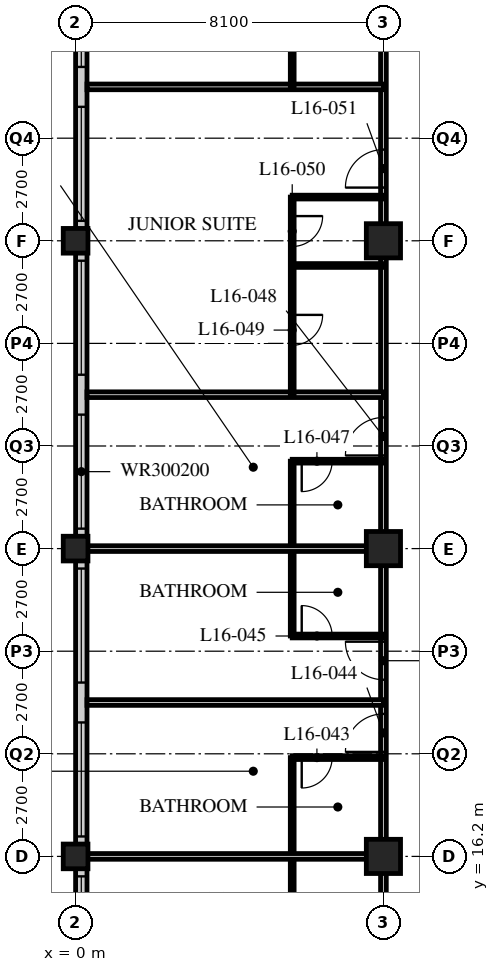
"""IFC4 building model, lengths in metres.
Left out: names, types, materials, properties, quantities, classifications, styles, units other than length and angle.
Written with IfcOpenShell. Run it as: python <this file> out.ifc"""

import sys

from ifc_helpers import new_model, si_unit, direction, frame, frame_2d, origin, origin_2d, place, context, subcontext, project, spatial, rectangle, hollow_rectangle, extrude, element, fill, save


model = new_model("IFC4")
c1 = context("Model", 3, precision=1e-05, world=origin(), true_north=direction((0.0, 1.0)))
c2 = subcontext(c1, "Body", "Model", "MODEL_VIEW")
j1 = project(units=[si_unit("LENGTHUNIT", "METRE"), si_unit("PLANEANGLEUNIT", "RADIAN")], contexts=[c1])
p1 = place(None, origin())
s1 = spatial("IfcSite", under=j1, at=p1, CompositionType="ELEMENT")
p2 = place(p1, origin())
s2 = spatial("IfcBuilding", under=s1, at=p2, CompositionType="ELEMENT")
p3 = place(p2, frame((0.0, 0.0, 67.0)))
s3 = spatial("IfcBuildingStorey", under=s2, at=p3, CompositionType="ELEMENT", Elevation=67.0)
for number, where, z_axis, x_axis in (
    (1, (0.0, 16.2, 0.0), (0.0, 0.0, 1.0), (1.0, 0.0, 0.0)),
    (2, (0.0, 24.3, 0.0), (0.0, 0.0, 1.0), (1.0, 0.0, 0.0)),
    (3, (0.0, 32.4, 0.0), (0.0, 0.0, 1.0), (1.0, 0.0, 0.0)),
):
    element("IfcColumn", number, at=place(p3, frame(where, z_axis=z_axis, x_axis=x_axis)), inside=s3, PredefinedType="COLUMN", context=c2, shape_type="SweptSolid", body=[
        extrude(hollow_rectangle(XDim=0.65, YDim=0.65, WallThickness=0.05, at=origin_2d()), origin(), (0.0, 0.0, 1.0), 3.4),
    ])
for number, where, z_axis, x_axis in (
    (4, (8.1, 16.2, 0.0), (0.0, 0.0, 1.0), (1.0, 0.0, 0.0)),
    (5, (8.1, 24.3, 0.0), (0.0, 0.0, 1.0), (1.0, 0.0, 0.0)),
    (6, (8.1, 32.4, 0.0), (0.0, 0.0, 1.0), (1.0, 0.0, 0.0)),
):
    element("IfcColumn", number, at=place(p3, frame(where, z_axis=z_axis, x_axis=x_axis)), inside=s3, PredefinedType="COLUMN", context=c2, shape_type="SweptSolid", body=[
        extrude(hollow_rectangle(XDim=0.9, YDim=0.9, WallThickness=0.09, at=origin_2d()), origin(), (0.0, 0.0, 1.0), 3.4),
    ])
p4 = place(p3, frame((0.15, 40.2, 0.0), z_axis=(0.0, 0.0, 1.0), x_axis=(0.0, -1.0, 0.0)))
e7 = element("IfcWall", 7, at=p4, inside=s3, PredefinedType="SOLIDWALL", context=c2, shape_type="SweptSolid", body=[
    extrude(rectangle(XDim=32.1, YDim=0.3, at=frame_2d((16.05, 0.0))), origin(), (0.0, 0.0, 1.0), 3.19),
])
p5 = place(p4, frame((0.225, 0.0, 0.9)))
e8 = element("IfcOpeningElement", 8, at=p5, cuts=e7, PredefinedType="OPENING", context=c2, shape_type="SweptSolid", body=[
    extrude(rectangle(XDim=3.0, YDim=2.0, at=frame_2d((1.5, 1.0))), frame((0.0, 0.16, 0.0), z_axis=(0.0, -1.0, 0.0), x_axis=(1.0, 0.0, 0.0)), (0.0, 0.0, 1.0), 0.32),
])
p6 = place(p4, frame((4.275, 0.0, 0.9)))
e9 = element("IfcOpeningElement", 9, at=p6, cuts=e7, PredefinedType="OPENING", context=c2, shape_type="SweptSolid", body=[
    extrude(rectangle(XDim=3.0, YDim=2.0, at=frame_2d((1.5, 1.0))), frame((0.0, 0.16, 0.0), z_axis=(0.0, -1.0, 0.0), x_axis=(1.0, 0.0, 0.0)), (0.0, 0.0, 1.0), 0.32),
])
p7 = place(p4, frame((8.325, 0.0, 0.9)))
e10 = element("IfcOpeningElement", 10, at=p7, cuts=e7, PredefinedType="OPENING", context=c2, shape_type="SweptSolid", body=[
    extrude(rectangle(XDim=3.0, YDim=2.0, at=frame_2d((1.5, 1.0))), frame((0.0, 0.16, 0.0), z_axis=(0.0, -1.0, 0.0), x_axis=(1.0, 0.0, 0.0)), (0.0, 0.0, 1.0), 0.32),
])
p8 = place(p4, frame((12.375, 0.0, 0.9)))
e11 = element("IfcOpeningElement", 11, at=p8, cuts=e7, PredefinedType="OPENING", context=c2, shape_type="SweptSolid", body=[
    extrude(rectangle(XDim=3.0, YDim=2.0, at=frame_2d((1.5, 1.0))), frame((0.0, 0.16, 0.0), z_axis=(0.0, -1.0, 0.0), x_axis=(1.0, 0.0, 0.0)), (0.0, 0.0, 1.0), 0.32),
])
p9 = place(p4, frame((16.425, 0.0, 0.9)))
e12 = element("IfcOpeningElement", 12, at=p9, cuts=e7, PredefinedType="OPENING", context=c2, shape_type="SweptSolid", body=[
    extrude(rectangle(XDim=3.0, YDim=2.0, at=frame_2d((1.5, 1.0))), frame((0.0, 0.16, 0.0), z_axis=(0.0, -1.0, 0.0), x_axis=(1.0, 0.0, 0.0)), (0.0, 0.0, 1.0), 0.32),
])
p10 = place(p4, frame((20.475, 0.0, 0.9)))
e13 = element("IfcOpeningElement", 13, at=p10, cuts=e7, PredefinedType="OPENING", context=c2, shape_type="SweptSolid", body=[
    extrude(rectangle(XDim=3.0, YDim=2.0, at=frame_2d((1.5, 1.0))), frame((0.0, 0.16, 0.0), z_axis=(0.0, -1.0, 0.0), x_axis=(1.0, 0.0, 0.0)), (0.0, 0.0, 1.0), 0.32),
])
p11 = place(p4, frame((24.525, 0.0, 0.9)))
e14 = element("IfcOpeningElement", 14, at=p11, cuts=e7, PredefinedType="OPENING", context=c2, shape_type="SweptSolid", body=[
    extrude(rectangle(XDim=3.0, YDim=2.0, at=frame_2d((1.5, 1.0))), frame((0.0, 0.16, 0.0), z_axis=(0.0, -1.0, 0.0), x_axis=(1.0, 0.0, 0.0)), (0.0, 0.0, 1.0), 0.32),
])
p12 = place(p4, frame((28.575, 0.0, 0.9)))
e15 = element("IfcOpeningElement", 15, at=p12, cuts=e7, PredefinedType="OPENING", context=c2, shape_type="SweptSolid", body=[
    extrude(rectangle(XDim=3.0, YDim=2.0, at=frame_2d((1.5, 1.0))), frame((0.0, 0.16, 0.0), z_axis=(0.0, -1.0, 0.0), x_axis=(1.0, 0.0, 0.0)), (0.0, 0.0, 1.0), 0.32),
])
p13 = place(p3, frame((8.1, 12.15, 0.0), z_axis=(0.0, 0.0, 1.0), x_axis=(0.0, 1.0, 0.0)))
e16 = element("IfcWall", 16, at=p13, inside=s3, PredefinedType="PARTITIONING", context=c2, shape_type="SweptSolid", body=[
    extrude(rectangle(XDim=30.15, YDim=0.15, at=frame_2d((15.075, 0.0))), origin(), (0.0, 0.0, 1.0), 2.578),
])
p14 = place(p13, frame((0.6, 0.0, 0.0)))
e17 = element("IfcOpeningElement", 17, at=p14, cuts=e16, PredefinedType="OPENING", context=c2, shape_type="SweptSolid", body=[
    extrude(rectangle(XDim=1.0, YDim=2.1, at=frame_2d((0.5, 1.05))), frame((0.0, 0.085, 0.0), z_axis=(0.0, -1.0, 0.0), x_axis=(1.0, 0.0, 0.0)), (0.0, 0.0, 1.0), 0.17),
])
p15 = place(p13, frame((6.8, 0.0, 0.0)))
e18 = element("IfcOpeningElement", 18, at=p15, cuts=e16, PredefinedType="OPENING", context=c2, shape_type="SweptSolid", body=[
    extrude(rectangle(XDim=1.0, YDim=2.1, at=frame_2d((0.5, 1.05))), frame((0.0, 0.085, 0.0), z_axis=(0.0, -1.0, 0.0), x_axis=(1.0, 0.0, 0.0)), (0.0, 0.0, 1.0), 0.17),
])
p16 = place(p13, frame((8.7, 0.0, 0.0)))
e19 = element("IfcOpeningElement", 19, at=p16, cuts=e16, PredefinedType="OPENING", context=c2, shape_type="SweptSolid", body=[
    extrude(rectangle(XDim=1.0, YDim=2.1, at=frame_2d((0.5, 1.05))), frame((0.0, 0.085, 0.0), z_axis=(0.0, -1.0, 0.0), x_axis=(1.0, 0.0, 0.0)), (0.0, 0.0, 1.0), 0.17),
])
p17 = place(p13, frame((14.6, 0.0, 0.0)))
e20 = element("IfcOpeningElement", 20, at=p17, cuts=e16, PredefinedType="OPENING", context=c2, shape_type="SweptSolid", body=[
    extrude(rectangle(XDim=1.0, YDim=2.1, at=frame_2d((0.5, 1.05))), frame((0.0, 0.085, 0.0), z_axis=(0.0, -1.0, 0.0), x_axis=(1.0, 0.0, 0.0)), (0.0, 0.0, 1.0), 0.17),
])
p18 = place(p13, frame((21.65, 0.0, 0.0)))
e21 = element("IfcOpeningElement", 21, at=p18, cuts=e16, PredefinedType="OPENING", context=c2, shape_type="SweptSolid", body=[
    extrude(rectangle(XDim=1.0, YDim=2.1, at=frame_2d((0.5, 1.05))), frame((0.0, 0.085, 0.0), z_axis=(0.0, -1.0, 0.0), x_axis=(1.0, 0.0, 0.0)), (0.0, 0.0, 1.0), 0.17),
])
p19 = place(p13, frame((26.75, 0.0, 0.0)))
e22 = element("IfcOpeningElement", 22, at=p19, cuts=e16, PredefinedType="OPENING", context=c2, shape_type="SweptSolid", body=[
    extrude(rectangle(XDim=1.0, YDim=2.1, at=frame_2d((0.5, 1.05))), frame((0.0, 0.085, 0.0), z_axis=(0.0, -1.0, 0.0), x_axis=(1.0, 0.0, 0.0)), (0.0, 0.0, 1.0), 0.17),
])
p20 = place(p3, frame((5.7, 13.9, 0.0), z_axis=(0.0, 0.0, 1.0), x_axis=(0.0, 1.0, 0.0)))
e23 = element("IfcWall", 23, at=p20, inside=s3, PredefinedType="PARTITIONING", context=c2, shape_type="SweptSolid", body=[
    extrude(rectangle(XDim=4.9, YDim=0.1, at=frame_2d((2.45, 0.0))), origin(), (0.0, 0.0, 1.0), 3.19),
])
p21 = place(p3, frame((8.1, 16.2, 0.0), z_axis=(0.0, 0.0, 1.0), x_axis=(-1.0, 0.0, 0.0)))
e24 = element("IfcWall", 24, at=p21, inside=s3, PredefinedType="PARTITIONING", context=c2, shape_type="SweptSolid", body=[
    extrude(rectangle(XDim=7.8, YDim=0.15, at=frame_2d((3.9, 0.0))), origin(), (0.0, 0.0, 1.0), 2.578),
])
p22 = place(p3, frame((8.1, 18.8, 0.0), z_axis=(0.0, 0.0, 1.0), x_axis=(-1.0, 0.0, 0.0)))
e25 = element("IfcWall", 25, at=p22, inside=s3, PredefinedType="PARTITIONING", context=c2, shape_type="SweptSolid", body=[
    extrude(rectangle(XDim=2.4, YDim=0.1, at=frame_2d((1.2, 0.0))), origin(), (0.0, 0.0, 1.0), 3.19),
])
p23 = place(p22, frame((1.35, 0.0, 0.0)))
e26 = element("IfcOpeningElement", 26, at=p23, cuts=e25, PredefinedType="OPENING", context=c2, shape_type="SweptSolid", body=[
    extrude(rectangle(XDim=0.8, YDim=2.1, at=frame_2d((0.4, 1.05))), frame((0.0, 0.06, 0.0), z_axis=(0.0, -1.0, 0.0), x_axis=(1.0, 0.0, 0.0)), (0.0, 0.0, 1.0), 0.12),
])
p24 = place(p3, frame((8.1, 20.25, 0.0), z_axis=(0.0, 0.0, 1.0), x_axis=(-1.0, 0.0, 0.0)))
e27 = element("IfcWall", 27, at=p24, inside=s3, PredefinedType="PARTITIONING", context=c2, shape_type="SweptSolid", body=[
    extrude(rectangle(XDim=7.8, YDim=0.15, at=frame_2d((3.9, 0.0))), origin(), (0.0, 0.0, 1.0), 3.19),
])
p25 = place(p3, frame((5.7, 22.0, 0.0), z_axis=(0.0, 0.0, 1.0), x_axis=(0.0, 1.0, 0.0)))
e28 = element("IfcWall", 28, at=p25, inside=s3, PredefinedType="PARTITIONING", context=c2, shape_type="SweptSolid", body=[
    extrude(rectangle(XDim=4.6, YDim=0.1, at=frame_2d((2.3, 0.0))), origin(), (0.0, 0.0, 1.0), 3.19),
])
p26 = place(p3, frame((8.1, 22.0, 0.0), z_axis=(0.0, 0.0, 1.0), x_axis=(-1.0, 0.0, 0.0)))
e29 = element("IfcWall", 29, at=p26, inside=s3, PredefinedType="PARTITIONING", context=c2, shape_type="SweptSolid", body=[
    extrude(rectangle(XDim=2.4, YDim=0.1, at=frame_2d((1.2, 0.0))), origin(), (0.0, 0.0, 1.0), 3.19),
])
p27 = place(p26, frame((1.35, 0.0, 0.0)))
e30 = element("IfcOpeningElement", 30, at=p27, cuts=e29, PredefinedType="OPENING", context=c2, shape_type="SweptSolid", body=[
    extrude(rectangle(XDim=0.8, YDim=2.1, at=frame_2d((0.4, 1.05))), frame((0.0, 0.06, 0.0), z_axis=(0.0, -1.0, 0.0), x_axis=(1.0, 0.0, 0.0)), (0.0, 0.0, 1.0), 0.12),
])
p28 = place(p3, frame((8.1, 24.3, 0.0), z_axis=(0.0, 0.0, 1.0), x_axis=(-1.0, 0.0, 0.0)))
e31 = element("IfcWall", 31, at=p28, inside=s3, PredefinedType="PARTITIONING", context=c2, shape_type="SweptSolid", body=[
    extrude(rectangle(XDim=7.8, YDim=0.15, at=frame_2d((3.9, 0.0))), origin(), (0.0, 0.0, 1.0), 2.578),
])
p29 = place(p3, frame((8.1, 26.6, 0.0), z_axis=(0.0, 0.0, 1.0), x_axis=(-1.0, 0.0, 0.0)))
e32 = element("IfcWall", 32, at=p29, inside=s3, PredefinedType="PARTITIONING", context=c2, shape_type="SweptSolid", body=[
    extrude(rectangle(XDim=2.4, YDim=0.1, at=frame_2d((1.2, 0.0))), origin(), (0.0, 0.0, 1.0), 3.19),
])
p30 = place(p29, frame((1.35, 0.0, 0.0)))
e33 = element("IfcOpeningElement", 33, at=p30, cuts=e32, PredefinedType="OPENING", context=c2, shape_type="SweptSolid", body=[
    extrude(rectangle(XDim=0.8, YDim=2.1, at=frame_2d((0.4, 1.05))), frame((0.0, 0.06, 0.0), z_axis=(0.0, -1.0, 0.0), x_axis=(1.0, 0.0, 0.0)), (0.0, 0.0, 1.0), 0.12),
])
p31 = place(p3, frame((8.1, 28.35, 0.0), z_axis=(0.0, 0.0, 1.0), x_axis=(-1.0, 0.0, 0.0)))
e34 = element("IfcWall", 34, at=p31, inside=s3, PredefinedType="PARTITIONING", context=c2, shape_type="SweptSolid", body=[
    extrude(rectangle(XDim=7.8, YDim=0.15, at=frame_2d((3.9, 0.0))), origin(), (0.0, 0.0, 1.0), 3.19),
])
p32 = place(p3, frame((5.7, 28.35, 0.0), z_axis=(0.0, 0.0, 1.0), x_axis=(0.0, 1.0, 0.0)))
e35 = element("IfcWall", 35, at=p32, inside=s3, PredefinedType="PARTITIONING", context=c2, shape_type="SweptSolid", body=[
    extrude(rectangle(XDim=5.2, YDim=0.1, at=frame_2d((2.6, 0.0))), origin(), (0.0, 0.0, 1.0), 3.19),
])
p33 = place(p32, frame((1.3, 0.0, 0.0)))
e36 = element("IfcOpeningElement", 36, at=p33, cuts=e35, PredefinedType="OPENING", context=c2, shape_type="SweptSolid", body=[
    extrude(rectangle(XDim=0.8, YDim=2.1, at=frame_2d((0.4, 1.05))), frame((0.0, 0.06, 0.0), z_axis=(0.0, -1.0, 0.0), x_axis=(1.0, 0.0, 0.0)), (0.0, 0.0, 1.0), 0.12),
])
p34 = place(p32, frame((3.9, 0.0, 0.0)))
e37 = element("IfcOpeningElement", 37, at=p34, cuts=e35, PredefinedType="OPENING", context=c2, shape_type="SweptSolid", body=[
    extrude(rectangle(XDim=0.8, YDim=2.1, at=frame_2d((0.4, 1.05))), frame((0.0, 0.06, 0.0), z_axis=(0.0, -1.0, 0.0), x_axis=(1.0, 0.0, 0.0)), (0.0, 0.0, 1.0), 0.12),
])
for number, where, z_axis, x_axis in (
    (38, (8.1, 31.75, 0.0), (0.0, 0.0, 1.0), (-1.0, 0.0, 0.0)),
    (39, (8.1, 33.55, 0.0), (0.0, 0.0, 1.0), (-1.0, 0.0, 0.0)),
):
    element("IfcWall", number, at=place(p3, frame(where, z_axis=z_axis, x_axis=x_axis)), inside=s3, PredefinedType="PARTITIONING", context=c2, shape_type="SweptSolid", body=[
        extrude(rectangle(XDim=2.4, YDim=0.1, at=frame_2d((1.2, 0.0))), origin(), (0.0, 0.0, 1.0), 3.19),
    ])
p35 = place(p3, frame((8.1, 36.45, 0.0), z_axis=(0.0, 0.0, 1.0), x_axis=(-1.0, 0.0, 0.0)))
e40 = element("IfcWall", 40, at=p35, inside=s3, PredefinedType="PARTITIONING", context=c2, shape_type="SweptSolid", body=[
    extrude(rectangle(XDim=7.8, YDim=0.15, at=frame_2d((3.9, 0.0))), origin(), (0.0, 0.0, 1.0), 3.19),
])
p36 = place(p3, frame((5.7, 36.45, 0.0), z_axis=(0.0, 0.0, 1.0), x_axis=(0.0, 1.0, 0.0)))
e41 = element("IfcWall", 41, at=p36, inside=s3, PredefinedType="PARTITIONING", context=c2, shape_type="SweptSolid", body=[
    extrude(rectangle(XDim=2.3, YDim=0.1, at=frame_2d((1.15, 0.0))), origin(), (0.0, 0.0, 1.0), 3.19),
])
p37 = place(p5, origin())
e42 = element("IfcWindow", 42, at=p37, inside=s3, PartitioningType="SINGLE_PANEL", PredefinedType="WINDOW", context=c2, shape_type="SweptSolid", body=[
    extrude(rectangle(XDim=3.0, YDim=2.0, at=frame_2d((1.5, 1.0))), frame((0.0, 0.03, 0.0), z_axis=(0.0, -1.0, 0.0), x_axis=(1.0, 0.0, 0.0)), (0.0, 0.0, 1.0), 0.06),
])
fill(e8, e42)
p38 = place(p6, origin())
e43 = element("IfcWindow", 43, at=p38, inside=s3, PartitioningType="SINGLE_PANEL", PredefinedType="WINDOW", context=c2, shape_type="SweptSolid", body=[
    extrude(rectangle(XDim=3.0, YDim=2.0, at=frame_2d((1.5, 1.0))), frame((0.0, 0.03, 0.0), z_axis=(0.0, -1.0, 0.0), x_axis=(1.0, 0.0, 0.0)), (0.0, 0.0, 1.0), 0.06),
])
fill(e9, e43)
p39 = place(p7, origin())
e44 = element("IfcWindow", 44, at=p39, inside=s3, PartitioningType="SINGLE_PANEL", PredefinedType="WINDOW", context=c2, shape_type="SweptSolid", body=[
    extrude(rectangle(XDim=3.0, YDim=2.0, at=frame_2d((1.5, 1.0))), frame((0.0, 0.03, 0.0), z_axis=(0.0, -1.0, 0.0), x_axis=(1.0, 0.0, 0.0)), (0.0, 0.0, 1.0), 0.06),
])
fill(e10, e44)
p40 = place(p8, origin())
e45 = element("IfcWindow", 45, at=p40, inside=s3, PartitioningType="SINGLE_PANEL", PredefinedType="WINDOW", context=c2, shape_type="SweptSolid", body=[
    extrude(rectangle(XDim=3.0, YDim=2.0, at=frame_2d((1.5, 1.0))), frame((0.0, 0.03, 0.0), z_axis=(0.0, -1.0, 0.0), x_axis=(1.0, 0.0, 0.0)), (0.0, 0.0, 1.0), 0.06),
])
fill(e11, e45)
p41 = place(p9, origin())
e46 = element("IfcWindow", 46, at=p41, inside=s3, PartitioningType="SINGLE_PANEL", PredefinedType="WINDOW", context=c2, shape_type="SweptSolid", body=[
    extrude(rectangle(XDim=3.0, YDim=2.0, at=frame_2d((1.5, 1.0))), frame((0.0, 0.03, 0.0), z_axis=(0.0, -1.0, 0.0), x_axis=(1.0, 0.0, 0.0)), (0.0, 0.0, 1.0), 0.06),
])
fill(e12, e46)
p42 = place(p10, origin())
e47 = element("IfcWindow", 47, at=p42, inside=s3, PartitioningType="SINGLE_PANEL", PredefinedType="WINDOW", context=c2, shape_type="SweptSolid", body=[
    extrude(rectangle(XDim=3.0, YDim=2.0, at=frame_2d((1.5, 1.0))), frame((0.0, 0.03, 0.0), z_axis=(0.0, -1.0, 0.0), x_axis=(1.0, 0.0, 0.0)), (0.0, 0.0, 1.0), 0.06),
])
fill(e13, e47)
p43 = place(p11, origin())
e48 = element("IfcWindow", 48, at=p43, inside=s3, PartitioningType="SINGLE_PANEL", PredefinedType="WINDOW", context=c2, shape_type="SweptSolid", body=[
    extrude(rectangle(XDim=3.0, YDim=2.0, at=frame_2d((1.5, 1.0))), frame((0.0, 0.03, 0.0), z_axis=(0.0, -1.0, 0.0), x_axis=(1.0, 0.0, 0.0)), (0.0, 0.0, 1.0), 0.06),
])
fill(e14, e48)
p44 = place(p23, origin())
e49 = element("IfcDoor", 49, at=p44, inside=s3, OperationType="SINGLE_SWING_RIGHT", PredefinedType="DOOR", context=c2, shape_type="SweptSolid", body=[
    extrude(rectangle(XDim=0.8, YDim=2.1, at=frame_2d((0.4, 1.05))), frame((0.0, 0.025, 0.0), z_axis=(0.0, -1.0, 0.0), x_axis=(1.0, 0.0, 0.0)), (0.0, 0.0, 1.0), 0.05),
])
fill(e26, e49)
p45 = place(p15, origin())
e50 = element("IfcDoor", 50, at=p45, inside=s3, OperationType="SINGLE_SWING_LEFT", PredefinedType="DOOR", context=c2, shape_type="SweptSolid", body=[
    extrude(rectangle(XDim=1.0, YDim=2.1, at=frame_2d((0.5, 1.05))), frame((0.0, 0.025, 0.0), z_axis=(0.0, -1.0, 0.0), x_axis=(1.0, 0.0, 0.0)), (0.0, 0.0, 1.0), 0.05),
])
fill(e18, e50)
p46 = place(p27, origin())
e51 = element("IfcDoor", 51, at=p46, inside=s3, OperationType="SINGLE_SWING_LEFT", PredefinedType="DOOR", context=c2, shape_type="SweptSolid", body=[
    extrude(rectangle(XDim=0.8, YDim=2.1, at=frame_2d((0.4, 1.05))), frame((0.0, 0.025, 0.0), z_axis=(0.0, -1.0, 0.0), x_axis=(1.0, 0.0, 0.0)), (0.0, 0.0, 1.0), 0.05),
])
fill(e30, e51)
p47 = place(p16, origin())
e52 = element("IfcDoor", 52, at=p47, inside=s3, OperationType="SINGLE_SWING_RIGHT", PredefinedType="DOOR", context=c2, shape_type="SweptSolid", body=[
    extrude(rectangle(XDim=1.0, YDim=2.1, at=frame_2d((0.5, 1.05))), frame((0.0, 0.025, 0.0), z_axis=(0.0, -1.0, 0.0), x_axis=(1.0, 0.0, 0.0)), (0.0, 0.0, 1.0), 0.05),
])
fill(e19, e52)
p48 = place(p30, origin())
e53 = element("IfcDoor", 53, at=p48, inside=s3, OperationType="SINGLE_SWING_RIGHT", PredefinedType="DOOR", context=c2, shape_type="SweptSolid", body=[
    extrude(rectangle(XDim=0.8, YDim=2.1, at=frame_2d((0.4, 1.05))), frame((0.0, 0.025, 0.0), z_axis=(0.0, -1.0, 0.0), x_axis=(1.0, 0.0, 0.0)), (0.0, 0.0, 1.0), 0.05),
])
fill(e33, e53)
p49 = place(p17, origin())
e54 = element("IfcDoor", 54, at=p49, inside=s3, OperationType="SINGLE_SWING_LEFT", PredefinedType="DOOR", context=c2, shape_type="SweptSolid", body=[
    extrude(rectangle(XDim=1.0, YDim=2.1, at=frame_2d((0.5, 1.05))), frame((0.0, 0.025, 0.0), z_axis=(0.0, -1.0, 0.0), x_axis=(1.0, 0.0, 0.0)), (0.0, 0.0, 1.0), 0.05),
])
fill(e20, e54)
p50 = place(p33, origin())
e55 = element("IfcDoor", 55, at=p50, inside=s3, OperationType="SINGLE_SWING_LEFT", PredefinedType="DOOR", context=c2, shape_type="SweptSolid", body=[
    extrude(rectangle(XDim=0.8, YDim=2.1, at=frame_2d((0.4, 1.05))), frame((0.0, 0.025, 0.0), z_axis=(0.0, -1.0, 0.0), x_axis=(1.0, 0.0, 0.0)), (0.0, 0.0, 1.0), 0.05),
])
fill(e36, e55)
p51 = place(p34, origin())
e56 = element("IfcDoor", 56, at=p51, inside=s3, OperationType="SINGLE_SWING_LEFT", PredefinedType="DOOR", context=c2, shape_type="SweptSolid", body=[
    extrude(rectangle(XDim=0.8, YDim=2.1, at=frame_2d((0.4, 1.05))), frame((0.0, 0.025, 0.0), z_axis=(0.0, -1.0, 0.0), x_axis=(1.0, 0.0, 0.0)), (0.0, 0.0, 1.0), 0.05),
])
fill(e37, e56)
p52 = place(p18, origin())
e57 = element("IfcDoor", 57, at=p52, inside=s3, OperationType="SINGLE_SWING_LEFT", PredefinedType="DOOR", context=c2, shape_type="SweptSolid", body=[
    extrude(rectangle(XDim=1.0, YDim=2.1, at=frame_2d((0.5, 1.05))), frame((0.0, 0.025, 0.0), z_axis=(0.0, -1.0, 0.0), x_axis=(1.0, 0.0, 0.0)), (0.0, 0.0, 1.0), 0.05),
])
fill(e21, e57)
save(model, sys.argv[1])
